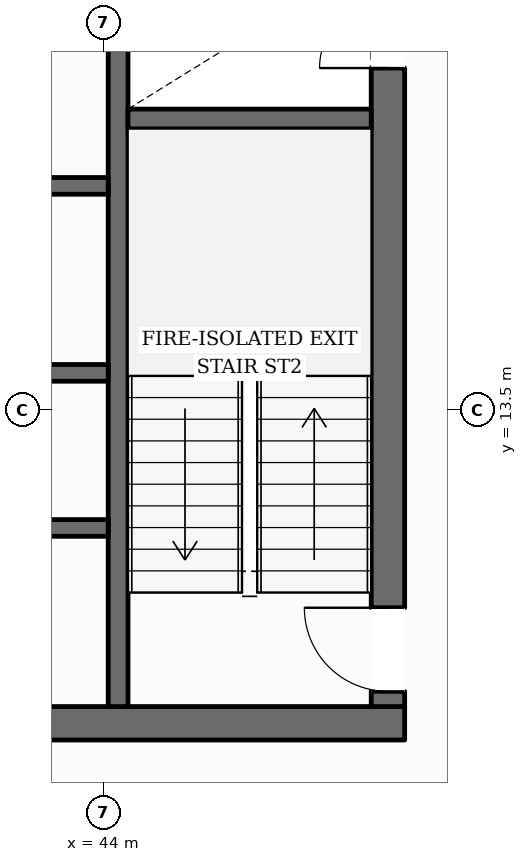
"""IFC4 building model, lengths in metres.
Left out: names, types, materials, properties, quantities, classifications, styles, units other than length and angle.
Written with IfcOpenShell. Run it as: python <this file> out.ifc"""

import sys

from ifc_helpers import new_model, si_unit, direction, frame, frame_2d, origin, place, context, subcontext, project, spatial, rectangle, extrude, element, fill, save


model = new_model("IFC4")
c1 = context("Model", 3, precision=1e-05, world=origin(), true_north=direction((0.0, 1.0)))
c2 = subcontext(c1, "Body", "Model", "MODEL_VIEW")
j1 = project(units=[si_unit("LENGTHUNIT", "METRE"), si_unit("PLANEANGLEUNIT", "RADIAN")], contexts=[c1])
p1 = place(None, origin())
s1 = spatial("IfcSite", under=j1, at=p1, CompositionType="ELEMENT")
p2 = place(p1, origin())
s2 = spatial("IfcBuilding", under=s1, at=p2, CompositionType="ELEMENT")
p3 = place(p2, frame((0.0, 0.0, 218.9)))
s3 = spatial("IfcBuildingStorey", under=s2, at=p3, CompositionType="ELEMENT", Elevation=218.9)
p4 = place(p3, frame((28.04, 9.38, 0.0), z_axis=(0.0, 0.0, 1.0), x_axis=(1.0, 0.0, 0.0)))
e1 = element("IfcWall", 1, at=p4, inside=s3, PredefinedType="SOLIDWALL", context=c2, shape_type="SweptSolid", body=[
    extrude(rectangle(XDim=19.92, YDim=0.44, at=frame_2d((9.96, 0.0))), origin(), (0.0, 0.0, 1.0), 3.6),
])
p5 = place(p4, frame((10.46, 0.0, 0.0)))
e2 = element("IfcOpeningElement", 2, at=p5, cuts=e1, PredefinedType="OPENING", context=c2, shape_type="SweptSolid", body=[
    extrude(rectangle(XDim=1.4, YDim=2.2, at=frame_2d((0.7, 1.1))), frame((0.0, 0.23, 0.0), z_axis=(0.0, -1.0, 0.0), x_axis=(1.0, 0.0, 0.0)), (0.0, 0.0, 1.0), 0.46),
])
p6 = place(p3, frame((47.74, 9.6, 0.0), z_axis=(0.0, 0.0, 1.0), x_axis=(0.0, 1.0, 0.0)))
e3 = element("IfcWall", 3, at=p6, inside=s3, PredefinedType="SOLIDWALL", context=c2, shape_type="SweptSolid", body=[
    extrude(rectangle(XDim=13.0, YDim=0.44, at=frame_2d((6.5, 0.0))), origin(), (0.0, 0.0, 1.0), 3.6),
])
p7 = place(p6, frame((0.2, 0.0, 0.0)))
e4 = element("IfcOpeningElement", 4, at=p7, cuts=e3, PredefinedType="OPENING", context=c2, shape_type="SweptSolid", body=[
    extrude(rectangle(XDim=1.1, YDim=2.15, at=frame_2d((0.55, 1.075))), frame((0.0, 0.23, 0.0), z_axis=(0.0, -1.0, 0.0), x_axis=(1.0, 0.0, 0.0)), (0.0, 0.0, 1.0), 0.46),
])
p8 = place(p6, frame((8.4, 0.0, 0.0)))
e5 = element("IfcOpeningElement", 5, at=p8, cuts=e3, PredefinedType="OPENING", context=c2, shape_type="SweptSolid", body=[
    extrude(rectangle(XDim=0.9, YDim=2.1, at=frame_2d((0.45, 1.05))), frame((0.0, 0.23, 0.0), z_axis=(0.0, -1.0, 0.0), x_axis=(1.0, 0.0, 0.0)), (0.0, 0.0, 1.0), 0.46),
])
p9 = place(p3, frame((44.19, 9.6, 0.0), z_axis=(0.0, 0.0, 1.0), x_axis=(0.0, 1.0, 0.0)))
e6 = element("IfcWall", 6, at=p9, inside=s3, PredefinedType="SHEAR", context=c2, shape_type="SweptSolid", body=[
    extrude(rectangle(XDim=13.0, YDim=0.26, at=frame_2d((6.5, 0.0))), origin(), (0.0, 0.0, 1.0), 3.6),
])
p10 = place(p9, frame((10.925, 0.0, 0.0)))
e7 = element("IfcOpeningElement", 7, at=p10, cuts=e6, PredefinedType="OPENING", context=c2, shape_type="SweptSolid", body=[
    extrude(rectangle(XDim=1.25, YDim=2.25, at=frame_2d((0.625, 1.125))), frame((0.0, 0.14, 0.0), z_axis=(0.0, -1.0, 0.0), x_axis=(1.0, 0.0, 0.0)), (0.0, 0.0, 1.0), 0.28),
])
p11 = place(p3, frame((44.32, 17.33, 0.0), z_axis=(0.0, 0.0, 1.0), x_axis=(1.0, 0.0, 0.0)))
e8 = element("IfcWall", 8, at=p11, inside=s3, PredefinedType="SHEAR", context=c2, shape_type="SweptSolid", body=[
    extrude(rectangle(XDim=3.2, YDim=0.26, at=frame_2d((1.6, 0.0))), origin(), (0.0, 0.0, 1.0), 3.6),
])
p12 = place(p3, frame((31.94, 16.45, 0.0), z_axis=(0.0, 0.0, 1.0), x_axis=(1.0, 0.0, 0.0)))
e9 = element("IfcWall", 9, at=p12, inside=s3, PredefinedType="SOLIDWALL", context=c2, shape_type="SweptSolid", body=[
    extrude(rectangle(XDim=12.12, YDim=0.22, at=frame_2d((6.06, 0.0))), origin(), (0.0, 0.0, 1.0), 3.6),
])
p13 = place(p3, frame((31.94, 13.99, 0.0), z_axis=(0.0, 0.0, 1.0), x_axis=(1.0, 0.0, 0.0)))
e10 = element("IfcWall", 10, at=p13, inside=s3, PredefinedType="SOLIDWALL", context=c2, shape_type="SweptSolid", body=[
    extrude(rectangle(XDim=12.12, YDim=0.22, at=frame_2d((6.06, 0.0))), origin(), (0.0, 0.0, 1.0), 3.6),
])
p14 = place(p13, frame((1.11, 0.0, 0.0)))
e11 = element("IfcOpeningElement", 11, at=p14, cuts=e10, PredefinedType="OPENING", context=c2, shape_type="SweptSolid", body=[
    extrude(rectangle(XDim=0.9, YDim=2.1, at=frame_2d((0.45, 1.05))), frame((0.0, 0.12, 0.0), z_axis=(0.0, -1.0, 0.0), x_axis=(1.0, 0.0, 0.0)), (0.0, 0.0, 1.0), 0.24),
])
p15 = place(p13, frame((5.16, 0.0, 0.0)))
e12 = element("IfcOpeningElement", 12, at=p15, cuts=e10, PredefinedType="OPENING", context=c2, shape_type="SweptSolid", body=[
    extrude(rectangle(XDim=0.9, YDim=2.1, at=frame_2d((0.45, 1.05))), frame((0.0, 0.12, 0.0), z_axis=(0.0, -1.0, 0.0), x_axis=(1.0, 0.0, 0.0)), (0.0, 0.0, 1.0), 0.24),
])
p16 = place(p13, frame((9.61, 0.0, 0.0)))
e13 = element("IfcOpeningElement", 13, at=p16, cuts=e10, PredefinedType="OPENING", context=c2, shape_type="SweptSolid", body=[
    extrude(rectangle(XDim=0.9, YDim=2.1, at=frame_2d((0.45, 1.05))), frame((0.0, 0.12, 0.0), z_axis=(0.0, -1.0, 0.0), x_axis=(1.0, 0.0, 0.0)), (0.0, 0.0, 1.0), 0.24),
])
p17 = place(p3, frame((40.28, 11.95, 0.0), z_axis=(0.0, 0.0, 1.0), x_axis=(1.0, 0.0, 0.0)))
e14 = element("IfcWall", 14, at=p17, inside=s3, PredefinedType="SOLIDWALL", context=c2, shape_type="SweptSolid", body=[
    extrude(rectangle(XDim=3.78, YDim=0.22, at=frame_2d((1.89, 0.0))), origin(), (0.0, 0.0, 1.0), 3.6),
])
p18 = place(p17, frame((1.55, 0.0, 0.0)))
e15 = element("IfcOpeningElement", 15, at=p18, cuts=e14, PredefinedType="OPENING", context=c2, shape_type="SweptSolid", body=[
    extrude(rectangle(XDim=0.9, YDim=2.1, at=frame_2d((0.45, 1.05))), frame((0.0, 0.12, 0.0), z_axis=(0.0, -1.0, 0.0), x_axis=(1.0, 0.0, 0.0)), (0.0, 0.0, 1.0), 0.24),
])
p19 = place(p3, frame((41.881, 44.812, 0.0), z_axis=(0.0, 0.0, 1.0), x_axis=(0.495686807291, -0.868501346618, 0.0)))
e16 = element("IfcWall", 16, at=p19, inside=s3, PredefinedType="STANDARD", context=c2, shape_type="SweptSolid", body=[
    extrude(rectangle(XDim=38.618, YDim=0.35, at=frame_2d((19.309, 0.0))), origin(), (0.0, 0.0, 1.0), 3.132),
])
p20 = place(p19, frame((34.278, 0.0, 0.65)))
e17 = element("IfcOpeningElement", 17, at=p20, cuts=e16, PredefinedType="OPENING", context=c2, shape_type="SweptSolid", body=[
    extrude(rectangle(XDim=1.45, YDim=1.75, at=frame_2d((0.725, 0.875))), frame((0.0, 0.185, 0.0), z_axis=(0.0, -1.0, 0.0), x_axis=(1.0, 0.0, 0.0)), (0.0, 0.0, 1.0), 0.37),
])
p21 = place(p19, frame((28.001, 0.0, 0.65)))
e18 = element("IfcOpeningElement", 18, at=p21, cuts=e16, PredefinedType="OPENING", context=c2, shape_type="SweptSolid", body=[
    extrude(rectangle(XDim=1.45, YDim=1.75, at=frame_2d((0.725, 0.875))), frame((0.0, 0.185, 0.0), z_axis=(0.0, -1.0, 0.0), x_axis=(1.0, 0.0, 0.0)), (0.0, 0.0, 1.0), 0.37),
])
p22 = place(p19, frame((15.448, 0.0, 0.65)))
e19 = element("IfcOpeningElement", 19, at=p22, cuts=e16, PredefinedType="OPENING", context=c2, shape_type="SweptSolid", body=[
    extrude(rectangle(XDim=1.45, YDim=1.75, at=frame_2d((0.725, 0.875))), frame((0.0, 0.185, 0.0), z_axis=(0.0, -1.0, 0.0), x_axis=(1.0, 0.0, 0.0)), (0.0, 0.0, 1.0), 0.37),
])
p23 = place(p19, frame((9.172, 0.0, 0.65)))
e20 = element("IfcOpeningElement", 20, at=p23, cuts=e16, PredefinedType="OPENING", context=c2, shape_type="SweptSolid", body=[
    extrude(rectangle(XDim=1.45, YDim=1.75, at=frame_2d((0.725, 0.875))), frame((0.0, 0.185, 0.0), z_axis=(0.0, -1.0, 0.0), x_axis=(1.0, 0.0, 0.0)), (0.0, 0.0, 1.0), 0.37),
])
p24 = place(p19, frame((2.895, 0.0, 0.65)))
e21 = element("IfcOpeningElement", 21, at=p24, cuts=e16, PredefinedType="OPENING", context=c2, shape_type="SweptSolid", body=[
    extrude(rectangle(XDim=1.45, YDim=1.75, at=frame_2d((0.725, 0.875))), frame((0.0, 0.185, 0.0), z_axis=(0.0, -1.0, 0.0), x_axis=(1.0, 0.0, 0.0)), (0.0, 0.0, 1.0), 0.37),
])
p25 = place(p7, origin())
e22 = element("IfcDoor", 22, at=p25, inside=s3, OperationType="SINGLE_SWING_RIGHT", PredefinedType="DOOR", context=c2, shape_type="SweptSolid", body=[
    extrude(rectangle(XDim=1.1, YDim=2.15, at=frame_2d((0.55, 1.075))), frame((0.0, 0.025, 0.0), z_axis=(0.0, -1.0, 0.0), x_axis=(1.0, 0.0, 0.0)), (0.0, 0.0, 1.0), 0.05),
])
fill(e4, e22)
p26 = place(p8, origin())
e23 = element("IfcDoor", 23, at=p26, inside=s3, OperationType="SINGLE_SWING_LEFT", PredefinedType="DOOR", context=c2, shape_type="SweptSolid", body=[
    extrude(rectangle(XDim=0.9, YDim=2.1, at=frame_2d((0.45, 1.05))), frame((0.0, 0.025, 0.0), z_axis=(0.0, -1.0, 0.0), x_axis=(1.0, 0.0, 0.0)), (0.0, 0.0, 1.0), 0.05),
])
fill(e5, e23)
save(model, sys.argv[1])
